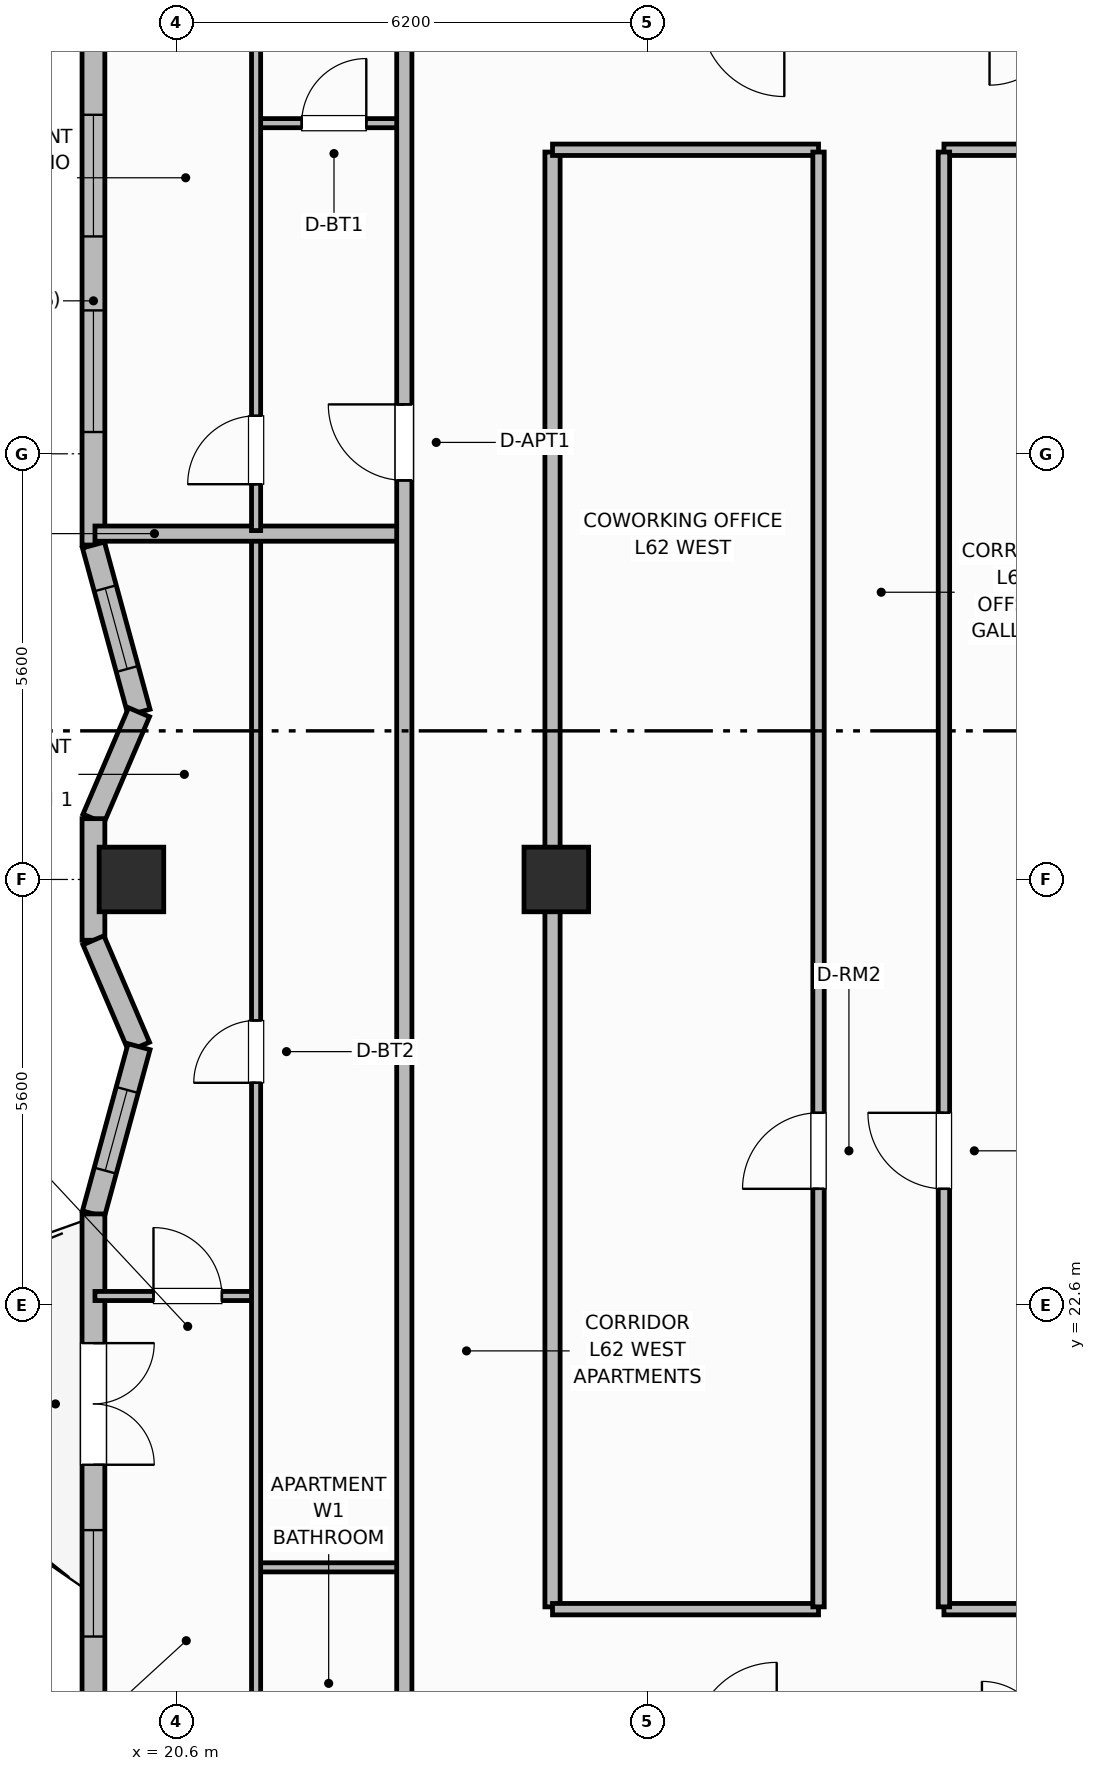
"""IFC4 building model, lengths in metres.
Left out: names, types, materials, properties, quantities, classifications, styles, units other than length and angle.
Written with IfcOpenShell. Run it as: python <this file> out.ifc"""

import sys

from ifc_helpers import new_model, si_unit, direction, frame, frame_2d, origin, origin_2d, place, context, subcontext, project, spatial, rectangle, extrude, element, fill, save


model = new_model("IFC4")
c1 = context("Model", 3, precision=1e-05, world=origin(), true_north=direction((0.0, 1.0)))
c2 = subcontext(c1, "Body", "Model", "MODEL_VIEW")
j1 = project(units=[si_unit("LENGTHUNIT", "METRE"), si_unit("PLANEANGLEUNIT", "RADIAN")], contexts=[c1])
p1 = place(None, origin())
s1 = spatial("IfcSite", under=j1, at=p1, CompositionType="ELEMENT")
p2 = place(p1, origin())
s2 = spatial("IfcBuilding", under=s1, at=p2, CompositionType="ELEMENT")
p3 = place(p2, frame((0.0, 0.0, 248.0)))
s3 = spatial("IfcBuildingStorey", under=s2, at=p3, CompositionType="ELEMENT", Elevation=248.0)
for number, where, z_axis, x_axis in (
    (1, (25.6, 28.2, 0.0), (0.0, 0.0, 1.0), (1.0, 0.0, 0.0)),
    (2, (20.01, 28.2, 0.0), (0.0, 0.0, 1.0), (1.0, 0.0, 0.0)),
):
    element("IfcColumn", number, at=place(p3, frame(where, z_axis=z_axis, x_axis=x_axis)), inside=s3, PredefinedType="COLUMN", context=c2, shape_type="SweptSolid", body=[
        extrude(rectangle(XDim=0.85, YDim=0.85, at=origin_2d()), origin(), (0.0, 0.0, 1.0), 3.7),
    ])
p4 = place(p3, frame((19.51, 43.72, 0.0), z_axis=(0.0, 0.0, 1.0), x_axis=(0.0, -1.0, 0.0)))
e3 = element("IfcWall", 3, at=p4, inside=s3, PredefinedType="SOLIDWALL", context=c2, shape_type="SweptSolid", body=[
    extrude(rectangle(XDim=11.12, YDim=0.3, at=frame_2d((5.56, 0.0))), origin(), (0.0, 0.0, 1.0), 2.73),
])
p5 = place(p4, frame((1.137, 0.0, 0.71)))
e4 = element("IfcOpeningElement", 4, at=p5, cuts=e3, PredefinedType="OPENING", context=c2, shape_type="SweptSolid", body=[
    extrude(rectangle(XDim=1.6, YDim=1.9, at=frame_2d((0.8, 0.95))), frame((0.0, 0.16, 0.0), z_axis=(0.0, -1.0, 0.0), x_axis=(1.0, 0.0, 0.0)), (0.0, 0.0, 1.0), 0.32),
])
p6 = place(p4, frame((5.46, 0.0, 0.71)))
e5 = element("IfcOpeningElement", 5, at=p6, cuts=e3, PredefinedType="OPENING", context=c2, shape_type="SweptSolid", body=[
    extrude(rectangle(XDim=1.6, YDim=1.9, at=frame_2d((0.8, 0.95))), frame((0.0, 0.16, 0.0), z_axis=(0.0, -1.0, 0.0), x_axis=(1.0, 0.0, 0.0)), (0.0, 0.0, 1.0), 0.32),
])
p7 = place(p4, frame((8.033, 0.0, 0.71)))
e6 = element("IfcOpeningElement", 6, at=p7, cuts=e3, PredefinedType="OPENING", context=c2, shape_type="SweptSolid", body=[
    extrude(rectangle(XDim=1.6, YDim=1.9, at=frame_2d((0.8, 0.95))), frame((0.0, 0.16, 0.0), z_axis=(0.0, -1.0, 0.0), x_axis=(1.0, 0.0, 0.0)), (0.0, 0.0, 1.0), 0.32),
])
p8 = place(p3, frame((19.51, 32.6, 0.0), z_axis=(0.0, 0.0, 1.0), x_axis=(0.263135522356, -0.964758880174, 0.0)))
e7 = element("IfcWall", 7, at=p8, inside=s3, PredefinedType="SOLIDWALL", context=c2, shape_type="SweptSolid", body=[
    extrude(rectangle(XDim=2.281, YDim=0.3, at=frame_2d((1.14, 0.0))), origin(), (0.0, 0.0, 1.0), 2.73),
])
p9 = place(p8, frame((0.59, 0.0, 0.92)))
e8 = element("IfcOpeningElement", 8, at=p9, cuts=e7, PredefinedType="OPENING", context=c2, shape_type="SweptSolid", body=[
    extrude(rectangle(XDim=1.1, YDim=1.65, at=frame_2d((0.55, 0.825))), frame((0.0, 0.16, 0.0), z_axis=(0.0, -1.0, 0.0), x_axis=(1.0, 0.0, 0.0)), (0.0, 0.0, 1.0), 0.32),
])
p10 = place(p3, frame((20.11, 30.4, 0.0), z_axis=(0.0, 0.0, 1.0), x_axis=(-0.39399667932, -0.919111862988, 0.0)))
e9 = element("IfcWall", 9, at=p10, inside=s3, PredefinedType="SOLIDWALL", context=c2, shape_type="SweptSolid", body=[
    extrude(rectangle(XDim=1.523, YDim=0.3, at=frame_2d((0.762, 0.0))), origin(), (0.0, 0.0, 1.0), 2.73),
])
p11 = place(p3, frame((19.51, 29.0, 0.0), z_axis=(0.0, 0.0, 1.0), x_axis=(0.0, -1.0, 0.0)))
e10 = element("IfcWall", 10, at=p11, inside=s3, PredefinedType="SOLIDWALL", context=c2, shape_type="SweptSolid", body=[
    extrude(rectangle(XDim=1.6, YDim=0.3, at=frame_2d((0.8, 0.0))), origin(), (0.0, 0.0, 1.0), 2.73),
])
p12 = place(p3, frame((19.51, 27.4, 0.0), z_axis=(0.0, 0.0, 1.0), x_axis=(0.39399667932, -0.919111862988, 0.0)))
e11 = element("IfcWall", 11, at=p12, inside=s3, PredefinedType="SOLIDWALL", context=c2, shape_type="SweptSolid", body=[
    extrude(rectangle(XDim=1.523, YDim=0.3, at=frame_2d((0.762, 0.0))), origin(), (0.0, 0.0, 1.0), 2.73),
])
p13 = place(p3, frame((20.11, 26.0, 0.0), z_axis=(0.0, 0.0, 1.0), x_axis=(-0.263162701705, -0.964751466665, 0.0)))
e12 = element("IfcWall", 12, at=p13, inside=s3, PredefinedType="SOLIDWALL", context=c2, shape_type="SweptSolid", body=[
    extrude(rectangle(XDim=2.28, YDim=0.3, at=frame_2d((1.14, 0.0))), origin(), (0.0, 0.0, 1.0), 2.73),
])
p14 = place(p13, frame((0.59, 0.0, 0.92)))
e13 = element("IfcOpeningElement", 13, at=p14, cuts=e12, PredefinedType="OPENING", context=c2, shape_type="SweptSolid", body=[
    extrude(rectangle(XDim=1.1, YDim=1.65, at=frame_2d((0.55, 0.825))), frame((0.0, 0.16, 0.0), z_axis=(0.0, -1.0, 0.0), x_axis=(1.0, 0.0, 0.0)), (0.0, 0.0, 1.0), 0.32),
])
p15 = place(p3, frame((19.51, 23.8, 0.0), z_axis=(0.0, 0.0, 1.0), x_axis=(0.0, -1.0, 0.0)))
e14 = element("IfcWall", 14, at=p15, inside=s3, PredefinedType="SOLIDWALL", context=c2, shape_type="SweptSolid", body=[
    extrude(rectangle(XDim=11.12, YDim=0.3, at=frame_2d((5.56, 0.0))), origin(), (0.0, 0.0, 1.0), 2.73),
])
p16 = place(p15, frame((1.7, 0.0, 0.0)))
e15 = element("IfcOpeningElement", 15, at=p16, cuts=e14, PredefinedType="OPENING", context=c2, shape_type="SweptSolid", body=[
    extrude(rectangle(XDim=1.6, YDim=2.1, at=frame_2d((0.8, 1.05))), frame((0.0, 0.16, 0.0), z_axis=(0.0, -1.0, 0.0), x_axis=(1.0, 0.0, 0.0)), (0.0, 0.0, 1.0), 0.32),
])
p17 = place(p15, frame((4.16, 0.0, 0.76)))
e16 = element("IfcOpeningElement", 16, at=p17, cuts=e14, PredefinedType="OPENING", context=c2, shape_type="SweptSolid", body=[
    extrude(rectangle(XDim=1.4, YDim=1.85, at=frame_2d((0.7, 0.925))), frame((0.0, 0.16, 0.0), z_axis=(0.0, -1.0, 0.0), x_axis=(1.0, 0.0, 0.0)), (0.0, 0.0, 1.0), 0.32),
])
p18 = place(p15, frame((8.483, 0.0, 0.76)))
e17 = element("IfcOpeningElement", 17, at=p18, cuts=e14, PredefinedType="OPENING", context=c2, shape_type="SweptSolid", body=[
    extrude(rectangle(XDim=1.4, YDim=1.85, at=frame_2d((0.7, 0.925))), frame((0.0, 0.16, 0.0), z_axis=(0.0, -1.0, 0.0), x_axis=(1.0, 0.0, 0.0)), (0.0, 0.0, 1.0), 0.32),
])
p19 = place(p3, frame((25.55, 18.63, 0.0), z_axis=(0.0, 0.0, 1.0), x_axis=(0.0, 1.0, 0.0)))
e18 = element("IfcWall", 18, at=p19, inside=s3, PredefinedType="PARTITIONING", context=c2, shape_type="SweptSolid", body=[
    extrude(rectangle(XDim=19.14, YDim=0.2, at=frame_2d((9.57, 0.0))), origin(), (0.0, 0.0, 1.0), 2.56),
])
p20 = place(p3, frame((25.55, 18.6, 0.0), z_axis=(0.0, 0.0, 1.0), x_axis=(1.0, 0.0, 0.0)))
e19 = element("IfcWall", 19, at=p20, inside=s3, PredefinedType="PARTITIONING", context=c2, shape_type="SweptSolid", body=[
    extrude(rectangle(XDim=3.5, YDim=0.15, at=frame_2d((1.75, 0.0))), origin(), (0.0, 0.0, 1.0), 2.56),
])
p21 = place(p3, frame((30.7, 18.6, 0.0), z_axis=(0.0, 0.0, 1.0), x_axis=(1.0, 0.0, 0.0)))
e20 = element("IfcWall", 20, at=p21, inside=s3, PredefinedType="PARTITIONING", context=c2, shape_type="SweptSolid", body=[
    extrude(rectangle(XDim=22.15, YDim=0.15, at=frame_2d((11.075, 0.0))), origin(), (0.0, 0.0, 1.0), 2.56),
])
p22 = place(p3, frame((25.55, 37.8, 0.0), z_axis=(0.0, 0.0, 1.0), x_axis=(1.0, 0.0, 0.0)))
e21 = element("IfcWall", 21, at=p22, inside=s3, PredefinedType="PARTITIONING", context=c2, shape_type="SweptSolid", body=[
    extrude(rectangle(XDim=3.5, YDim=0.15, at=frame_2d((1.75, 0.0))), origin(), (0.0, 0.0, 1.0), 2.56),
])
p23 = place(p3, frame((30.7, 37.8, 0.0), z_axis=(0.0, 0.0, 1.0), x_axis=(1.0, 0.0, 0.0)))
e22 = element("IfcWall", 22, at=p23, inside=s3, PredefinedType="PARTITIONING", context=c2, shape_type="SweptSolid", body=[
    extrude(rectangle(XDim=22.15, YDim=0.15, at=frame_2d((11.075, 0.0))), origin(), (0.0, 0.0, 1.0), 2.56),
])
p24 = place(p3, frame((29.05, 18.63, 0.0), z_axis=(0.0, 0.0, 1.0), x_axis=(0.0, 1.0, 0.0)))
e23 = element("IfcWall", 23, at=p24, inside=s3, PredefinedType="PARTITIONING", context=c2, shape_type="SweptSolid", body=[
    extrude(rectangle(XDim=19.14, YDim=0.15, at=frame_2d((9.57, 0.0))), origin(), (0.0, 0.0, 1.0), 2.56),
])
p25 = place(p24, frame((5.5, 0.0, 0.0)))
e24 = element("IfcOpeningElement", 24, at=p25, cuts=e23, PredefinedType="OPENING", context=c2, shape_type="SweptSolid", body=[
    extrude(rectangle(XDim=1.0, YDim=2.15, at=frame_2d((0.5, 1.075))), frame((0.0, 0.085, 0.0), z_axis=(0.0, -1.0, 0.0), x_axis=(1.0, 0.0, 0.0)), (0.0, 0.0, 1.0), 0.17),
])
p26 = place(p3, frame((30.7, 18.63, 0.0), z_axis=(0.0, 0.0, 1.0), x_axis=(0.0, 1.0, 0.0)))
e25 = element("IfcWall", 25, at=p26, inside=s3, PredefinedType="PARTITIONING", context=c2, shape_type="SweptSolid", body=[
    extrude(rectangle(XDim=19.14, YDim=0.15, at=frame_2d((9.57, 0.0))), origin(), (0.0, 0.0, 1.0), 2.56),
])
p27 = place(p26, frame((5.5, 0.0, 0.0)))
e26 = element("IfcOpeningElement", 26, at=p27, cuts=e25, PredefinedType="OPENING", context=c2, shape_type="SweptSolid", body=[
    extrude(rectangle(XDim=1.0, YDim=2.15, at=frame_2d((0.5, 1.075))), frame((0.0, 0.085, 0.0), z_axis=(0.0, -1.0, 0.0), x_axis=(1.0, 0.0, 0.0)), (0.0, 0.0, 1.0), 0.17),
])
p28 = place(p3, frame((21.65, 19.15, 0.0), z_axis=(0.0, 0.0, 1.0), x_axis=(1.0, 0.0, 0.0)))
e27 = element("IfcWall", 27, at=p28, inside=s3, PredefinedType="PARTITIONING", context=c2, shape_type="SweptSolid", body=[
    extrude(rectangle(XDim=1.95, YDim=0.12, at=frame_2d((0.975, 0.0))), origin(), (0.0, 0.0, 1.0), 2.56),
])
p29 = place(p3, frame((19.53, 22.72, 0.0), z_axis=(0.0, 0.0, 1.0), x_axis=(1.0, 0.0, 0.0)))
e28 = element("IfcWall", 28, at=p29, inside=s3, PredefinedType="PARTITIONING", context=c2, shape_type="SweptSolid", body=[
    extrude(rectangle(XDim=2.12, YDim=0.12, at=frame_2d((1.06, 0.0))), origin(), (0.0, 0.0, 1.0), 2.56),
])
p30 = place(p29, frame((0.77, 0.0, 0.0)))
e29 = element("IfcOpeningElement", 29, at=p30, cuts=e28, PredefinedType="OPENING", context=c2, shape_type="SweptSolid", body=[
    extrude(rectangle(XDim=0.9, YDim=2.1, at=frame_2d((0.45, 1.05))), frame((0.0, 0.07, 0.0), z_axis=(0.0, -1.0, 0.0), x_axis=(1.0, 0.0, 0.0)), (0.0, 0.0, 1.0), 0.14),
])
p31 = place(p3, frame((21.65, 9.99, 0.0), z_axis=(0.0, 0.0, 1.0), x_axis=(0.0, 1.0, 0.0)))
e30 = element("IfcWall", 30, at=p31, inside=s3, PredefinedType="PARTITIONING", context=c2, shape_type="SweptSolid", body=[
    extrude(rectangle(XDim=22.72, YDim=0.12, at=frame_2d((11.36, 0.0))), origin(), (0.0, 0.0, 1.0), 2.56),
])
p32 = place(p31, frame((0.41, 0.0, 0.0)))
e31 = element("IfcOpeningElement", 31, at=p32, cuts=e30, PredefinedType="OPENING", context=c2, shape_type="SweptSolid", body=[
    extrude(rectangle(XDim=0.9, YDim=2.1, at=frame_2d((0.45, 1.05))), frame((0.0, 0.07, 0.0), z_axis=(0.0, -1.0, 0.0), x_axis=(1.0, 0.0, 0.0)), (0.0, 0.0, 1.0), 0.14),
])
p33 = place(p31, frame((15.535, 0.0, 0.0)))
e32 = element("IfcOpeningElement", 32, at=p33, cuts=e30, PredefinedType="OPENING", context=c2, shape_type="SweptSolid", body=[
    extrude(rectangle(XDim=0.82, YDim=2.08, at=frame_2d((0.41, 1.04))), frame((0.0, 0.07, 0.0), z_axis=(0.0, -1.0, 0.0), x_axis=(1.0, 0.0, 0.0)), (0.0, 0.0, 1.0), 0.14),
])
p34 = place(p3, frame((19.53, 32.75, 0.0), z_axis=(0.0, 0.0, 1.0), x_axis=(1.0, 0.0, 0.0)))
e33 = element("IfcWall", 33, at=p34, inside=s3, PredefinedType="PARTITIONING", context=c2, shape_type="SweptSolid", body=[
    extrude(rectangle(XDim=4.07, YDim=0.2, at=frame_2d((2.035, 0.0))), origin(), (0.0, 0.0, 1.0), 2.56),
])
p35 = place(p3, frame((21.65, 38.15, 0.0), z_axis=(0.0, 0.0, 1.0), x_axis=(1.0, 0.0, 0.0)))
e34 = element("IfcWall", 34, at=p35, inside=s3, PredefinedType="PARTITIONING", context=c2, shape_type="SweptSolid", body=[
    extrude(rectangle(XDim=1.95, YDim=0.12, at=frame_2d((0.975, 0.0))), origin(), (0.0, 0.0, 1.0), 2.56),
])
p36 = place(p35, frame((0.6, 0.0, 0.0)))
e35 = element("IfcOpeningElement", 35, at=p36, cuts=e34, PredefinedType="OPENING", context=c2, shape_type="SweptSolid", body=[
    extrude(rectangle(XDim=0.85, YDim=2.1, at=frame_2d((0.425, 1.05))), frame((0.0, 0.07, 0.0), z_axis=(0.0, -1.0, 0.0), x_axis=(1.0, 0.0, 0.0)), (0.0, 0.0, 1.0), 0.14),
])
p37 = place(p3, frame((21.65, 32.79, 0.0), z_axis=(0.0, 0.0, 1.0), x_axis=(0.0, 1.0, 0.0)))
e36 = element("IfcWall", 36, at=p37, inside=s3, PredefinedType="PARTITIONING", context=c2, shape_type="SweptSolid", body=[
    extrude(rectangle(XDim=13.62, YDim=0.12, at=frame_2d((6.81, 0.0))), origin(), (0.0, 0.0, 1.0), 2.56),
])
p38 = place(p37, frame((0.61, 0.0, 0.0)))
e37 = element("IfcOpeningElement", 37, at=p38, cuts=e36, PredefinedType="OPENING", context=c2, shape_type="SweptSolid", body=[
    extrude(rectangle(XDim=0.9, YDim=2.1, at=frame_2d((0.45, 1.05))), frame((0.0, 0.07, 0.0), z_axis=(0.0, -1.0, 0.0), x_axis=(1.0, 0.0, 0.0)), (0.0, 0.0, 1.0), 0.14),
])
p39 = place(p37, frame((10.985, 0.0, 0.0)))
e38 = element("IfcOpeningElement", 38, at=p39, cuts=e36, PredefinedType="OPENING", context=c2, shape_type="SweptSolid", body=[
    extrude(rectangle(XDim=0.82, YDim=2.08, at=frame_2d((0.41, 1.04))), frame((0.0, 0.07, 0.0), z_axis=(0.0, -1.0, 0.0), x_axis=(1.0, 0.0, 0.0)), (0.0, 0.0, 1.0), 0.14),
])
p40 = place(p3, frame((23.6, 9.95, 0.0), z_axis=(0.0, 0.0, 1.0), x_axis=(0.0, 1.0, 0.0)))
e39 = element("IfcWall", 39, at=p40, inside=s3, PredefinedType="PARTITIONING", context=c2, shape_type="SweptSolid", body=[
    extrude(rectangle(XDim=36.5, YDim=0.2, at=frame_2d((18.25, 0.0))), origin(), (0.0, 0.0, 1.0), 2.56),
])
p41 = place(p40, frame((3.25, 0.0, 0.0)))
e40 = element("IfcOpeningElement", 40, at=p41, cuts=e39, PredefinedType="OPENING", context=c2, shape_type="SweptSolid", body=[
    extrude(rectangle(XDim=1.0, YDim=2.15, at=frame_2d((0.5, 1.075))), frame((0.0, 0.11, 0.0), z_axis=(0.0, -1.0, 0.0), x_axis=(1.0, 0.0, 0.0)), (0.0, 0.0, 1.0), 0.22),
])
p42 = place(p40, frame((23.5, 0.0, 0.0)))
e41 = element("IfcOpeningElement", 41, at=p42, cuts=e39, PredefinedType="OPENING", context=c2, shape_type="SweptSolid", body=[
    extrude(rectangle(XDim=1.0, YDim=2.15, at=frame_2d((0.5, 1.075))), frame((0.0, 0.11, 0.0), z_axis=(0.0, -1.0, 0.0), x_axis=(1.0, 0.0, 0.0)), (0.0, 0.0, 1.0), 0.22),
])
p43 = place(p6, origin())
e42 = element("IfcWindow", 42, at=p43, inside=s3, PartitioningType="SINGLE_PANEL", PredefinedType="WINDOW", context=c2, shape_type="SweptSolid", body=[
    extrude(rectangle(XDim=1.6, YDim=1.9, at=frame_2d((0.8, 0.95))), frame((0.0, 0.03, 0.0), z_axis=(0.0, -1.0, 0.0), x_axis=(1.0, 0.0, 0.0)), (0.0, 0.0, 1.0), 0.06),
])
fill(e5, e42)
p44 = place(p7, origin())
e43 = element("IfcWindow", 43, at=p44, inside=s3, PartitioningType="SINGLE_PANEL", PredefinedType="WINDOW", context=c2, shape_type="SweptSolid", body=[
    extrude(rectangle(XDim=1.6, YDim=1.9, at=frame_2d((0.8, 0.95))), frame((0.0, 0.03, 0.0), z_axis=(0.0, -1.0, 0.0), x_axis=(1.0, 0.0, 0.0)), (0.0, 0.0, 1.0), 0.06),
])
fill(e6, e43)
p45 = place(p9, origin())
e44 = element("IfcWindow", 44, at=p45, inside=s3, PartitioningType="SINGLE_PANEL", PredefinedType="WINDOW", context=c2, shape_type="SweptSolid", body=[
    extrude(rectangle(XDim=1.1, YDim=1.65, at=frame_2d((0.55, 0.825))), frame((0.0, 0.03, 0.0), z_axis=(0.0, -1.0, 0.0), x_axis=(1.0, 0.0, 0.0)), (0.0, 0.0, 1.0), 0.06),
])
fill(e8, e44)
p46 = place(p14, origin())
e45 = element("IfcWindow", 45, at=p46, inside=s3, PartitioningType="SINGLE_PANEL", PredefinedType="WINDOW", context=c2, shape_type="SweptSolid", body=[
    extrude(rectangle(XDim=1.1, YDim=1.65, at=frame_2d((0.55, 0.825))), frame((0.0, 0.03, 0.0), z_axis=(0.0, -1.0, 0.0), x_axis=(1.0, 0.0, 0.0)), (0.0, 0.0, 1.0), 0.06),
])
fill(e13, e45)
p47 = place(p16, origin())
e46 = element("IfcDoor", 46, at=p47, inside=s3, OperationType="DOUBLE_DOOR_SINGLE_SWING", PredefinedType="DOOR", context=c2, shape_type="SweptSolid", body=[
    extrude(rectangle(XDim=1.6, YDim=2.1, at=frame_2d((0.8, 1.05))), frame((0.0, 0.025, 0.0), z_axis=(0.0, -1.0, 0.0), x_axis=(1.0, 0.0, 0.0)), (0.0, 0.0, 1.0), 0.05),
])
fill(e15, e46)
p48 = place(p17, origin())
e47 = element("IfcWindow", 47, at=p48, inside=s3, PartitioningType="SINGLE_PANEL", PredefinedType="WINDOW", context=c2, shape_type="SweptSolid", body=[
    extrude(rectangle(XDim=1.4, YDim=1.85, at=frame_2d((0.7, 0.925))), frame((0.0, 0.03, 0.0), z_axis=(0.0, -1.0, 0.0), x_axis=(1.0, 0.0, 0.0)), (0.0, 0.0, 1.0), 0.06),
])
fill(e16, e47)
p49 = place(p25, origin())
e48 = element("IfcDoor", 48, at=p49, inside=s3, OperationType="SINGLE_SWING_LEFT", PredefinedType="DOOR", context=c2, shape_type="SweptSolid", body=[
    extrude(rectangle(XDim=1.0, YDim=2.15, at=frame_2d((0.5, 1.075))), frame((0.0, 0.025, 0.0), z_axis=(0.0, -1.0, 0.0), x_axis=(1.0, 0.0, 0.0)), (0.0, 0.0, 1.0), 0.05),
])
fill(e24, e48)
p50 = place(p27, origin())
e49 = element("IfcDoor", 49, at=p50, inside=s3, OperationType="SINGLE_SWING_RIGHT", PredefinedType="DOOR", context=c2, shape_type="SweptSolid", body=[
    extrude(rectangle(XDim=1.0, YDim=2.15, at=frame_2d((0.5, 1.075))), frame((0.0, 0.025, 0.0), z_axis=(0.0, -1.0, 0.0), x_axis=(1.0, 0.0, 0.0)), (0.0, 0.0, 1.0), 0.05),
])
fill(e26, e49)
p51 = place(p30, origin())
e50 = element("IfcDoor", 50, at=p51, inside=s3, OperationType="SINGLE_SWING_LEFT", PredefinedType="DOOR", context=c2, shape_type="SweptSolid", body=[
    extrude(rectangle(XDim=0.9, YDim=2.1, at=frame_2d((0.45, 1.05))), frame((0.0, 0.025, 0.0), z_axis=(0.0, -1.0, 0.0), x_axis=(1.0, 0.0, 0.0)), (0.0, 0.0, 1.0), 0.05),
])
fill(e29, e50)
p52 = place(p33, origin())
e51 = element("IfcDoor", 51, at=p52, inside=s3, OperationType="SINGLE_SWING_LEFT", PredefinedType="DOOR", context=c2, shape_type="SweptSolid", body=[
    extrude(rectangle(XDim=0.82, YDim=2.08, at=frame_2d((0.41, 1.04))), frame((0.0, 0.025, 0.0), z_axis=(0.0, -1.0, 0.0), x_axis=(1.0, 0.0, 0.0)), (0.0, 0.0, 1.0), 0.05),
])
fill(e32, e51)
p53 = place(p36, origin())
e52 = element("IfcDoor", 52, at=p53, inside=s3, OperationType="SINGLE_SWING_RIGHT", PredefinedType="DOOR", context=c2, shape_type="SweptSolid", body=[
    extrude(rectangle(XDim=0.85, YDim=2.1, at=frame_2d((0.425, 1.05))), frame((0.0, 0.025, 0.0), z_axis=(0.0, -1.0, 0.0), x_axis=(1.0, 0.0, 0.0)), (0.0, 0.0, 1.0), 0.05),
])
fill(e35, e52)
p54 = place(p38, origin())
e53 = element("IfcDoor", 53, at=p54, inside=s3, OperationType="SINGLE_SWING_LEFT", PredefinedType="DOOR", context=c2, shape_type="SweptSolid", body=[
    extrude(rectangle(XDim=0.9, YDim=2.1, at=frame_2d((0.45, 1.05))), frame((0.0, 0.025, 0.0), z_axis=(0.0, -1.0, 0.0), x_axis=(1.0, 0.0, 0.0)), (0.0, 0.0, 1.0), 0.05),
])
fill(e37, e53)
p55 = place(p42, origin())
e54 = element("IfcDoor", 54, at=p55, inside=s3, OperationType="SINGLE_SWING_RIGHT", PredefinedType="DOOR", context=c2, shape_type="SweptSolid", body=[
    extrude(rectangle(XDim=1.0, YDim=2.15, at=frame_2d((0.5, 1.075))), frame((0.0, 0.025, 0.0), z_axis=(0.0, -1.0, 0.0), x_axis=(1.0, 0.0, 0.0)), (0.0, 0.0, 1.0), 0.05),
])
fill(e41, e54)
save(model, sys.argv[1])
